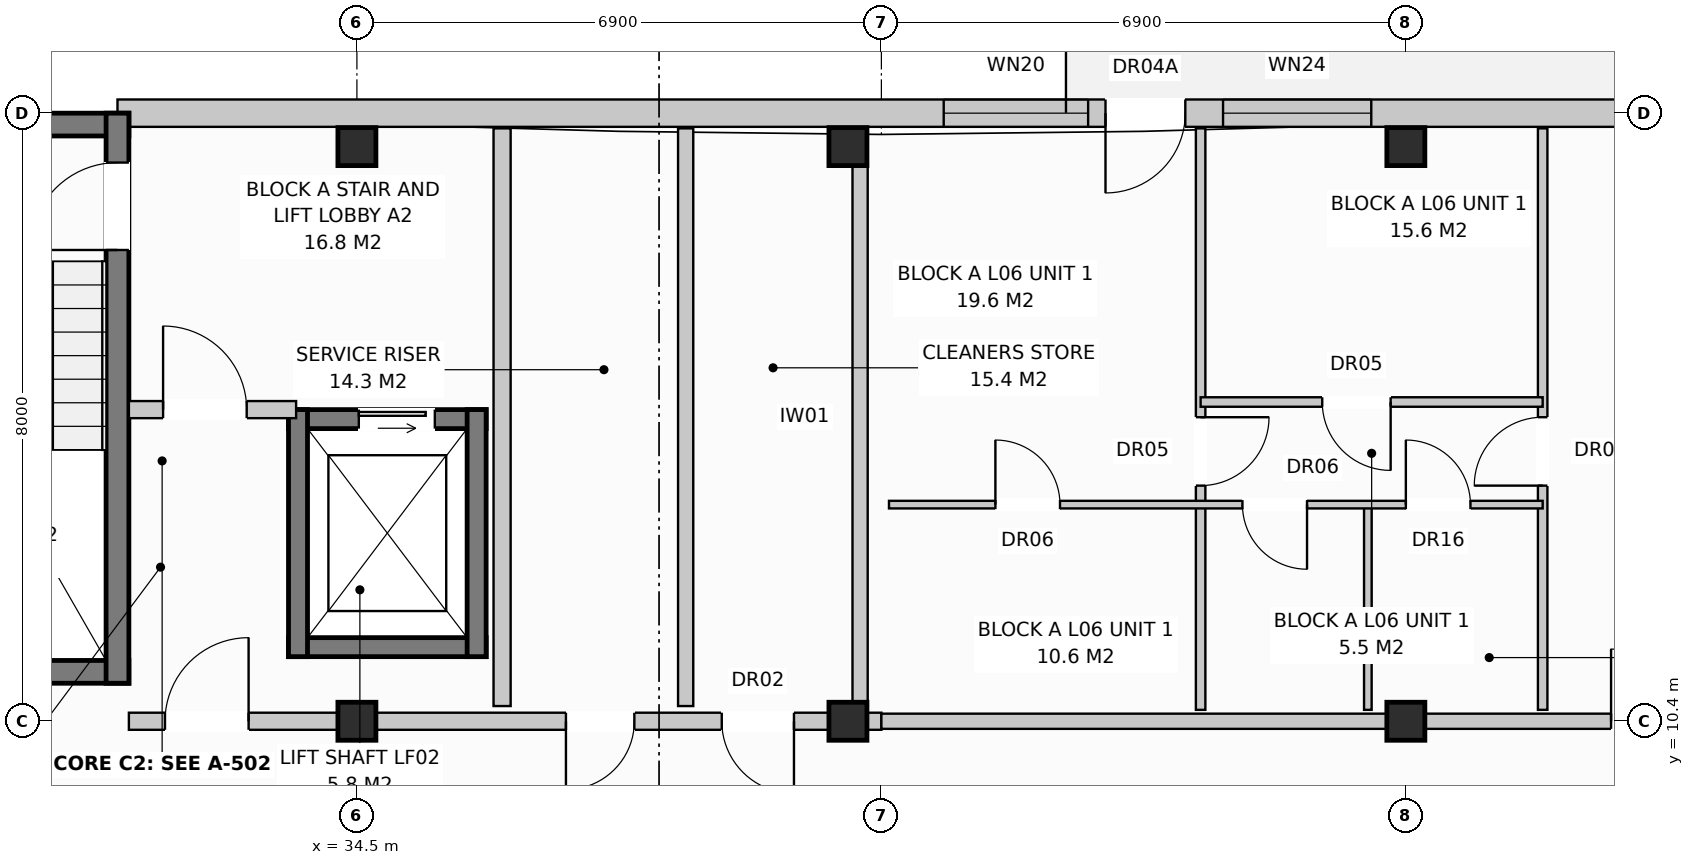
"""IFC4 building model, lengths in metres.
Left out: names, types, materials, properties, quantities, classifications, styles, units other than length and angle.
Written with IfcOpenShell. Run it as: python <this file> out.ifc"""

import sys

from ifc_helpers import new_model, si_unit, direction, frame, frame_2d, origin, origin_with_axes, origin_2d, place, context, subcontext, project, spatial, rectangle, extrude, element, fill, save


model = new_model("IFC4")
c1 = context("Model", 3, precision=1e-05, world=origin(), true_north=direction((0.0, 1.0)))
c2 = subcontext(c1, "Body", "Model", "MODEL_VIEW")
j1 = project(units=[si_unit("LENGTHUNIT", "METRE"), si_unit("PLANEANGLEUNIT", "RADIAN")], contexts=[c1])
p1 = place(None, origin())
s1 = spatial("IfcSite", under=j1, at=p1, CompositionType="ELEMENT")
p2 = place(p1, origin())
s2 = spatial("IfcBuilding", under=s1, at=p2, CompositionType="ELEMENT")
p3 = place(p2, frame((0.0, 0.0, 20.8)))
s3 = spatial("IfcBuildingStorey", under=s2, at=p3, CompositionType="ELEMENT", Elevation=20.8)
for number, where, z_axis, x_axis in (
    (1, (34.5, 10.4, 0.0), (0.0, 0.0, 1.0), (1.0, 0.0, 0.0)),
    (2, (34.5, 17.96, 0.0), (0.0, 0.0, 1.0), (1.0, 0.0, 0.0)),
    (3, (40.96, 10.4, 0.0), (0.0, 0.0, 1.0), (1.0, 0.0, 0.0)),
    (4, (40.96, 17.96, 0.0), (0.0, 0.0, 1.0), (1.0, 0.0, 0.0)),
    (5, (48.3, 10.4, 0.0), (0.0, 0.0, 1.0), (1.0, 0.0, 0.0)),
    (6, (48.3, 17.96, 0.0), (0.0, 0.0, 1.0), (1.0, 0.0, 0.0)),
):
    element("IfcColumn", number, at=place(p3, frame(where, z_axis=z_axis, x_axis=x_axis)), inside=s3, PredefinedType="COLUMN", context=c2, shape_type="SweptSolid", body=[
        extrude(rectangle(XDim=0.5, YDim=0.5, at=origin_2d()), origin(), (0.0, 0.0, 1.0), 3.2),
    ])
p4 = place(p3, frame((31.35, 18.4, 0.0), z_axis=(0.0, 0.0, 1.0), x_axis=(1.0, 0.0, 0.0)))
e7 = element("IfcWall", 7, at=p4, inside=s3, PredefinedType="STANDARD", context=c2, shape_type="SweptSolid", body=[
    extrude(rectangle(XDim=23.68, YDim=0.36, at=frame_2d((11.84, 0.0))), origin(), (0.0, 0.0, 1.0), 2.95),
])
p5 = place(p4, frame((12.999, 0.0, 0.0)))
e8 = element("IfcOpeningElement", 8, at=p5, cuts=e7, PredefinedType="OPENING", context=c2, shape_type="SweptSolid", body=[
    extrude(rectangle(XDim=1.05, YDim=2.12, at=frame_2d((0.525, 1.06))), frame((0.0, 0.192, 0.0), z_axis=(0.0, -1.0, 0.0), x_axis=(1.0, 0.0, 0.0)), (0.0, 0.0, 1.0), 0.384),
])
p6 = place(p4, frame((10.87, 0.0, 0.8)))
e9 = element("IfcOpeningElement", 9, at=p6, cuts=e7, PredefinedType="OPENING", context=c2, shape_type="SweptSolid", body=[
    extrude(rectangle(XDim=1.9, YDim=1.85, at=frame_2d((0.95, 0.925))), frame((0.0, 0.192, 0.0), z_axis=(0.0, -1.0, 0.0), x_axis=(1.0, 0.0, 0.0)), (0.0, 0.0, 1.0), 0.384),
])
p7 = place(p4, frame((14.545, 0.0, 0.8)))
e10 = element("IfcOpeningElement", 10, at=p7, cuts=e7, PredefinedType="OPENING", context=c2, shape_type="SweptSolid", body=[
    extrude(rectangle(XDim=1.95, YDim=1.65, at=frame_2d((0.975, 0.825))), frame((0.0, 0.192, 0.0), z_axis=(0.0, -1.0, 0.0), x_axis=(1.0, 0.0, 0.0)), (0.0, 0.0, 1.0), 0.384),
])
p8 = place(p4, frame((20.67, 0.0, 0.72)))
e11 = element("IfcOpeningElement", 11, at=p8, cuts=e7, PredefinedType="OPENING", context=c2, shape_type="SweptSolid", body=[
    extrude(rectangle(XDim=1.1, YDim=1.5, at=frame_2d((0.55, 0.75))), frame((0.0, 0.192, 0.0), z_axis=(0.0, -1.0, 0.0), x_axis=(1.0, 0.0, 0.0)), (0.0, 0.0, 1.0), 0.384),
])
for number, where, z_axis, x_axis in (
    (12, (27.9, 18.25, 0.0), (0.0, 0.0, 1.0), (1.0, 0.0, 0.0)),
    (13, (27.9, 11.05, 0.0), (0.0, 0.0, 1.0), (1.0, 0.0, 0.0)),
):
    element("IfcWall", number, at=place(p3, frame(where, z_axis=z_axis, x_axis=x_axis)), inside=s3, PredefinedType="SHEAR", context=c2, shape_type="SweptSolid", body=[
        extrude(rectangle(XDim=3.6, YDim=0.3, at=frame_2d((1.8, 0.0))), origin(), (0.0, 0.0, 1.0), 2.95),
    ])
p9 = place(p3, frame((31.35, 10.9, 0.0), z_axis=(0.0, 0.0, 1.0), x_axis=(0.0, 1.0, 0.0)))
e14 = element("IfcWall", 14, at=p9, inside=s3, PredefinedType="SHEAR", context=c2, shape_type="SweptSolid", body=[
    extrude(rectangle(XDim=7.5, YDim=0.3, at=frame_2d((3.75, 0.0))), origin(), (0.0, 0.0, 1.0), 2.95),
])
p10 = place(p9, frame((5.7, 0.0, 0.0)))
e15 = element("IfcOpeningElement", 15, at=p10, cuts=e14, PredefinedType="OPENING", context=c2, shape_type="SweptSolid", body=[
    extrude(rectangle(XDim=1.15, YDim=2.15, at=frame_2d((0.575, 1.075))), frame((0.0, 0.162, 0.0), z_axis=(0.0, -1.0, 0.0), x_axis=(1.0, 0.0, 0.0)), (0.0, 0.0, 1.0), 0.324),
])
p11 = place(p3, frame((33.6, 14.375, 0.0), z_axis=(0.0, 0.0, 1.0), x_axis=(1.0, 0.0, 0.0)))
e16 = element("IfcWall", 16, at=p11, inside=s3, PredefinedType="SHEAR", context=c2, shape_type="SweptSolid", body=[
    extrude(rectangle(XDim=2.6, YDim=0.25, at=frame_2d((1.3, 0.0))), origin(), (0.0, 0.0, 1.0), 2.95),
])
p12 = place(p11, frame((0.925, 0.0, 0.0)))
e17 = element("IfcOpeningElement", 17, at=p12, cuts=e16, PredefinedType="OPENING", context=c2, shape_type="SweptSolid", body=[
    extrude(rectangle(XDim=1.0, YDim=2.1, at=frame_2d((0.5, 1.05))), frame((0.0, 0.137, 0.0), z_axis=(0.0, -1.0, 0.0), x_axis=(1.0, 0.0, 0.0)), (0.0, 0.0, 1.0), 0.274),
])
p13 = place(p3, frame((33.6, 11.375, 0.0), z_axis=(0.0, 0.0, 1.0), x_axis=(1.0, 0.0, 0.0)))
e18 = element("IfcWall", 18, at=p13, inside=s3, PredefinedType="SHEAR", context=c2, shape_type="SweptSolid", body=[
    extrude(rectangle(XDim=2.6, YDim=0.25, at=frame_2d((1.3, 0.0))), origin(), (0.0, 0.0, 1.0), 2.95),
])
for number, where, z_axis, x_axis in (
    (19, (33.725, 11.25, 0.0), (0.0, 0.0, 1.0), (0.0, 1.0, 0.0)),
    (20, (36.075, 11.25, 0.0), (0.0, 0.0, 1.0), (0.0, 1.0, 0.0)),
):
    element("IfcWall", number, at=place(p3, frame(where, z_axis=z_axis, x_axis=x_axis)), inside=s3, PredefinedType="SHEAR", context=c2, shape_type="SweptSolid", body=[
        extrude(rectangle(XDim=3.25, YDim=0.25, at=frame_2d((1.625, 0.0))), origin(), (0.0, 0.0, 1.0), 2.95),
    ])
p14 = place(p3, frame((36.41, 10.6, 0.0), z_axis=(0.0, 0.0, 1.0), x_axis=(0.0, 1.0, 0.0)))
e21 = element("IfcWall", 21, at=p14, inside=s3, PredefinedType="PARTITIONING", context=c2, shape_type="SweptSolid", body=[
    extrude(rectangle(XDim=7.6, YDim=0.225, at=frame_2d((3.8, 0.0))), origin(), (0.0, 0.0, 1.0), 2.59),
])
p15 = place(p3, frame((31.5, 14.5, 0.0), z_axis=(0.0, 0.0, 1.0), x_axis=(1.0, 0.0, 0.0)))
e22 = element("IfcWall", 22, at=p15, inside=s3, PredefinedType="PARTITIONING", context=c2, shape_type="SweptSolid", body=[
    extrude(rectangle(XDim=2.2, YDim=0.225, at=frame_2d((1.1, 0.0))), origin(), (0.0, 0.0, 1.0), 2.95),
])
p16 = place(p15, frame((0.45, 0.0, 0.0)))
e23 = element("IfcOpeningElement", 23, at=p16, cuts=e22, PredefinedType="OPENING", context=c2, shape_type="SweptSolid", body=[
    extrude(rectangle(XDim=1.1, YDim=2.15, at=frame_2d((0.55, 1.075))), frame((0.0, 0.125, 0.0), z_axis=(0.0, -1.0, 0.0), x_axis=(1.0, 0.0, 0.0)), (0.0, 0.0, 1.0), 0.249),
])
for number, where, z_axis, x_axis in (
    (24, (38.825, 10.6, 0.0), (0.0, 0.0, 1.0), (0.0, 1.0, 0.0)),
    (25, (41.12, 10.6, 0.0), (0.0, 0.0, 1.0), (0.0, 1.0, 0.0)),
):
    element("IfcWall", number, at=place(p3, frame(where, z_axis=z_axis, x_axis=x_axis)), inside=s3, PredefinedType="PARTITIONING", context=c2, shape_type="SweptSolid", body=[
        extrude(rectangle(XDim=7.6, YDim=0.2, at=frame_2d((3.8, 0.0))), origin(), (0.0, 0.0, 1.0), 2.95),
    ])
p17 = place(p3, frame((31.5, 10.4, 0.0), z_axis=(0.0, 0.0, 1.0), x_axis=(1.0, 0.0, 0.0)))
e26 = element("IfcWall", 26, at=p17, inside=s3, PredefinedType="PARTITIONING", context=c2, shape_type="SweptSolid", body=[
    extrude(rectangle(XDim=9.9, YDim=0.225, at=frame_2d((4.95, 0.0))), origin(), (0.0, 0.0, 1.0), 2.39),
])
p18 = place(p17, frame((0.475, 0.0, 0.0)))
e27 = element("IfcOpeningElement", 27, at=p18, cuts=e26, PredefinedType="OPENING", context=c2, shape_type="SweptSolid", body=[
    extrude(rectangle(XDim=1.1, YDim=2.15, at=frame_2d((0.55, 1.075))), frame((0.0, 0.125, 0.0), z_axis=(0.0, -1.0, 0.0), x_axis=(1.0, 0.0, 0.0)), (0.0, 0.0, 1.0), 0.249),
])
p19 = place(p17, frame((5.75, 0.0, 0.0)))
e28 = element("IfcOpeningElement", 28, at=p19, cuts=e26, PredefinedType="OPENING", context=c2, shape_type="SweptSolid", body=[
    extrude(rectangle(XDim=0.9, YDim=2.1, at=frame_2d((0.45, 1.05))), frame((0.0, 0.125, 0.0), z_axis=(0.0, -1.0, 0.0), x_axis=(1.0, 0.0, 0.0)), (0.0, 0.0, 1.0), 0.249),
])
p20 = place(p17, frame((7.8, 0.0, 0.0)))
e29 = element("IfcOpeningElement", 29, at=p20, cuts=e26, PredefinedType="OPENING", context=c2, shape_type="SweptSolid", body=[
    extrude(rectangle(XDim=0.95, YDim=2.15, at=frame_2d((0.475, 1.075))), frame((0.0, 0.125, 0.0), z_axis=(0.0, -1.0, 0.0), x_axis=(1.0, 0.0, 0.0)), (0.0, 0.0, 1.0), 0.249),
])
p21 = place(p3, frame((41.4, 10.4, 0.0), z_axis=(0.0, 0.0, 1.0), x_axis=(1.0, 0.0, 0.0)))
e30 = element("IfcWall", 30, at=p21, inside=s3, PredefinedType="PARTITIONING", context=c2, shape_type="SweptSolid", body=[
    extrude(rectangle(XDim=13.8, YDim=0.2, at=frame_2d((6.9, 0.0))), origin(), (0.0, 0.0, 1.0), 2.39),
])
p22 = place(p21, frame((9.6, 0.0, 0.0)))
e31 = element("IfcOpeningElement", 31, at=p22, cuts=e30, PredefinedType="OPENING", context=c2, shape_type="SweptSolid", body=[
    extrude(rectangle(XDim=0.95, YDim=2.15, at=frame_2d((0.475, 1.075))), frame((0.0, 0.112, 0.0), z_axis=(0.0, -1.0, 0.0), x_axis=(1.0, 0.0, 0.0)), (0.0, 0.0, 1.0), 0.224),
])
p23 = place(p3, frame((50.1, 10.55, 0.0), z_axis=(0.0, 0.0, 1.0), x_axis=(0.0, 1.0, 0.0)))
e32 = element("IfcWall", 32, at=p23, inside=s3, PredefinedType="PARTITIONING", context=c2, shape_type="SweptSolid", body=[
    extrude(rectangle(XDim=7.65, YDim=0.125, at=frame_2d((3.825, 0.0))), origin(), (0.0, 0.0, 1.0), 2.95),
])
p24 = place(p23, frame((2.95, 0.0, 0.0)))
e33 = element("IfcOpeningElement", 33, at=p24, cuts=e32, PredefinedType="OPENING", context=c2, shape_type="SweptSolid", body=[
    extrude(rectangle(XDim=0.9, YDim=2.1, at=frame_2d((0.45, 1.05))), frame((0.0, 0.074, 0.0), z_axis=(0.0, -1.0, 0.0), x_axis=(1.0, 0.0, 0.0)), (0.0, 0.0, 1.0), 0.149),
])
p25 = place(p3, frame((45.6, 10.55, 0.0), z_axis=(0.0, 0.0, 1.0), x_axis=(0.0, 1.0, 0.0)))
e34 = element("IfcWall", 34, at=p25, inside=s3, PredefinedType="PARTITIONING", context=c2, shape_type="SweptSolid", body=[
    extrude(rectangle(XDim=7.65, YDim=0.125, at=frame_2d((3.825, 0.0))), origin(), (0.0, 0.0, 1.0), 2.95),
])
p26 = place(p25, frame((2.95, 0.0, 0.0)))
e35 = element("IfcOpeningElement", 35, at=p26, cuts=e34, PredefinedType="OPENING", context=c2, shape_type="SweptSolid", body=[
    extrude(rectangle(XDim=0.9, YDim=2.1, at=frame_2d((0.45, 1.05))), frame((0.0, 0.074, 0.0), z_axis=(0.0, -1.0, 0.0), x_axis=(1.0, 0.0, 0.0)), (0.0, 0.0, 1.0), 0.149),
])
p27 = place(p3, frame((47.8, 10.55, 0.0), z_axis=(0.0, 0.0, 1.0), x_axis=(0.0, 1.0, 0.0)))
e36 = element("IfcWall", 36, at=p27, inside=s3, PredefinedType="PARTITIONING", context=c2, shape_type="SweptSolid", body=[
    extrude(rectangle(XDim=2.7, YDim=0.1, at=frame_2d((1.35, 0.0))), origin(), (0.0, 0.0, 1.0), 2.95),
])
p28 = place(p3, frame((41.5, 13.25, 0.0), z_axis=(0.0, 0.0, 1.0), x_axis=(1.0, 0.0, 0.0)))
e37 = element("IfcWall", 37, at=p28, inside=s3, PredefinedType="PARTITIONING", context=c2, shape_type="SweptSolid", body=[
    extrude(rectangle(XDim=8.6, YDim=0.1, at=frame_2d((4.3, 0.0))), origin(), (0.0, 0.0, 1.0), 2.95),
])
p29 = place(p28, frame((1.4, 0.0, 0.0)))
e38 = element("IfcOpeningElement", 38, at=p29, cuts=e37, PredefinedType="OPENING", context=c2, shape_type="SweptSolid", body=[
    extrude(rectangle(XDim=0.85, YDim=2.05, at=frame_2d((0.425, 1.025))), frame((0.0, 0.062, 0.0), z_axis=(0.0, -1.0, 0.0), x_axis=(1.0, 0.0, 0.0)), (0.0, 0.0, 1.0), 0.124),
])
p30 = place(p28, frame((4.65, 0.0, 0.0)))
e39 = element("IfcOpeningElement", 39, at=p30, cuts=e37, PredefinedType="OPENING", context=c2, shape_type="SweptSolid", body=[
    extrude(rectangle(XDim=0.85, YDim=2.05, at=frame_2d((0.425, 1.025))), frame((0.0, 0.062, 0.0), z_axis=(0.0, -1.0, 0.0), x_axis=(1.0, 0.0, 0.0)), (0.0, 0.0, 1.0), 0.124),
])
p31 = place(p28, frame((6.8, 0.0, 0.0)))
e40 = element("IfcOpeningElement", 40, at=p31, cuts=e37, PredefinedType="OPENING", context=c2, shape_type="SweptSolid", body=[
    extrude(rectangle(XDim=0.85, YDim=2.1, at=frame_2d((0.425, 1.05))), frame((0.0, 0.062, 0.0), z_axis=(0.0, -1.0, 0.0), x_axis=(1.0, 0.0, 0.0)), (0.0, 0.0, 1.0), 0.124),
])
p32 = place(p3, frame((45.6, 14.6, 0.0), z_axis=(0.0, 0.0, 1.0), x_axis=(1.0, 0.0, 0.0)))
e41 = element("IfcWall", 41, at=p32, inside=s3, PredefinedType="PARTITIONING", context=c2, shape_type="SweptSolid", body=[
    extrude(rectangle(XDim=4.5, YDim=0.125, at=frame_2d((2.25, 0.0))), origin(), (0.0, 0.0, 1.0), 2.95),
])
p33 = place(p32, frame((1.6, 0.0, 0.0)))
e42 = element("IfcOpeningElement", 42, at=p33, cuts=e41, PredefinedType="OPENING", context=c2, shape_type="SweptSolid", body=[
    extrude(rectangle(XDim=0.9, YDim=2.1, at=frame_2d((0.45, 1.05))), frame((0.0, 0.074, 0.0), z_axis=(0.0, -1.0, 0.0), x_axis=(1.0, 0.0, 0.0)), (0.0, 0.0, 1.0), 0.149),
])
p34 = place(p5, frame((1.05, 0.0, 0.0), z_axis=(0.0, 0.0, 1.0), x_axis=(-1.0, 0.0, 0.0)))
e43 = element("IfcDoor", 43, at=p34, inside=s3, OperationType="SINGLE_SWING_LEFT", PredefinedType="DOOR", context=c2, shape_type="SweptSolid", body=[
    extrude(rectangle(XDim=1.05, YDim=2.12, at=frame_2d((0.525, 1.06))), frame((0.0, 0.025, 0.0), z_axis=(0.0, -1.0, 0.0), x_axis=(1.0, 0.0, 0.0)), (0.0, 0.0, 1.0), 0.05),
])
fill(e8, e43)
p35 = place(p6, origin_with_axes())
e44 = element("IfcWindow", 44, at=p35, inside=s3, PartitioningType="SINGLE_PANEL", PredefinedType="WINDOW", context=c2, shape_type="SweptSolid", body=[
    extrude(rectangle(XDim=1.9, YDim=1.85, at=frame_2d((0.95, 0.925))), frame((0.0, 0.03, 0.0), z_axis=(0.0, -1.0, 0.0), x_axis=(1.0, 0.0, 0.0)), (0.0, 0.0, 1.0), 0.06),
])
fill(e9, e44)
p36 = place(p7, origin_with_axes())
e45 = element("IfcWindow", 45, at=p36, inside=s3, PartitioningType="SINGLE_PANEL", PredefinedType="WINDOW", context=c2, shape_type="SweptSolid", body=[
    extrude(rectangle(XDim=1.95, YDim=1.65, at=frame_2d((0.975, 0.825))), frame((0.0, 0.03, 0.0), z_axis=(0.0, -1.0, 0.0), x_axis=(1.0, 0.0, 0.0)), (0.0, 0.0, 1.0), 0.06),
])
fill(e10, e45)
p37 = place(p10, origin_with_axes())
e46 = element("IfcDoor", 46, at=p37, inside=s3, OperationType="SINGLE_SWING_LEFT", PredefinedType="DOOR", context=c2, shape_type="SweptSolid", body=[
    extrude(rectangle(XDim=1.15, YDim=2.15, at=frame_2d((0.575, 1.075))), frame((0.0, 0.025, 0.0), z_axis=(0.0, -1.0, 0.0), x_axis=(1.0, 0.0, 0.0)), (0.0, 0.0, 1.0), 0.05),
])
fill(e15, e46)
p38 = place(p12, origin_with_axes())
e47 = element("IfcDoor", 47, at=p38, inside=s3, OperationType="SLIDING_TO_LEFT", PredefinedType="DOOR", context=c2, shape_type="SweptSolid", body=[
    extrude(rectangle(XDim=1.0, YDim=2.1, at=frame_2d((0.5, 1.05))), frame((0.0, 0.025, 0.0), z_axis=(0.0, -1.0, 0.0), x_axis=(1.0, 0.0, 0.0)), (0.0, 0.0, 1.0), 0.05),
])
fill(e17, e47)
p39 = place(p16, origin_with_axes())
e48 = element("IfcDoor", 48, at=p39, inside=s3, OperationType="SINGLE_SWING_LEFT", PredefinedType="DOOR", context=c2, shape_type="SweptSolid", body=[
    extrude(rectangle(XDim=1.1, YDim=2.15, at=frame_2d((0.55, 1.075))), frame((0.0, 0.025, 0.0), z_axis=(0.0, -1.0, 0.0), x_axis=(1.0, 0.0, 0.0)), (0.0, 0.0, 1.0), 0.05),
])
fill(e23, e48)
p40 = place(p18, origin_with_axes())
e49 = element("IfcDoor", 49, at=p40, inside=s3, OperationType="SINGLE_SWING_RIGHT", PredefinedType="DOOR", context=c2, shape_type="SweptSolid", body=[
    extrude(rectangle(XDim=1.1, YDim=2.15, at=frame_2d((0.55, 1.075))), frame((0.0, 0.025, 0.0), z_axis=(0.0, -1.0, 0.0), x_axis=(1.0, 0.0, 0.0)), (0.0, 0.0, 1.0), 0.05),
])
fill(e27, e49)
p41 = place(p19, frame((0.9, 0.0, 0.0), z_axis=(0.0, 0.0, 1.0), x_axis=(-1.0, 0.0, 0.0)))
e50 = element("IfcDoor", 50, at=p41, inside=s3, OperationType="SINGLE_SWING_LEFT", PredefinedType="DOOR", context=c2, shape_type="SweptSolid", body=[
    extrude(rectangle(XDim=0.9, YDim=2.1, at=frame_2d((0.45, 1.05))), frame((0.0, 0.025, 0.0), z_axis=(0.0, -1.0, 0.0), x_axis=(1.0, 0.0, 0.0)), (0.0, 0.0, 1.0), 0.05),
])
fill(e28, e50)
p42 = place(p20, frame((0.95, 0.0, 0.0), z_axis=(0.0, 0.0, 1.0), x_axis=(-1.0, 0.0, 0.0)))
e51 = element("IfcDoor", 51, at=p42, inside=s3, OperationType="SINGLE_SWING_RIGHT", PredefinedType="DOOR", context=c2, shape_type="SweptSolid", body=[
    extrude(rectangle(XDim=0.95, YDim=2.15, at=frame_2d((0.475, 1.075))), frame((0.0, 0.025, 0.0), z_axis=(0.0, -1.0, 0.0), x_axis=(1.0, 0.0, 0.0)), (0.0, 0.0, 1.0), 0.05),
])
fill(e29, e51)
p43 = place(p22, origin_with_axes())
e52 = element("IfcDoor", 52, at=p43, inside=s3, OperationType="SINGLE_SWING_LEFT", PredefinedType="DOOR", context=c2, shape_type="SweptSolid", body=[
    extrude(rectangle(XDim=0.95, YDim=2.15, at=frame_2d((0.475, 1.075))), frame((0.0, 0.025, 0.0), z_axis=(0.0, -1.0, 0.0), x_axis=(1.0, 0.0, 0.0)), (0.0, 0.0, 1.0), 0.05),
])
fill(e31, e52)
p44 = place(p24, origin_with_axes())
e53 = element("IfcDoor", 53, at=p44, inside=s3, OperationType="SINGLE_SWING_LEFT", PredefinedType="DOOR", context=c2, shape_type="SweptSolid", body=[
    extrude(rectangle(XDim=0.9, YDim=2.1, at=frame_2d((0.45, 1.05))), frame((0.0, 0.025, 0.0), z_axis=(0.0, -1.0, 0.0), x_axis=(1.0, 0.0, 0.0)), (0.0, 0.0, 1.0), 0.05),
])
fill(e33, e53)
p45 = place(p26, frame((0.9, 0.0, 0.0), z_axis=(0.0, 0.0, 1.0), x_axis=(-1.0, 0.0, 0.0)))
e54 = element("IfcDoor", 54, at=p45, inside=s3, OperationType="SINGLE_SWING_RIGHT", PredefinedType="DOOR", context=c2, shape_type="SweptSolid", body=[
    extrude(rectangle(XDim=0.9, YDim=2.1, at=frame_2d((0.45, 1.05))), frame((0.0, 0.025, 0.0), z_axis=(0.0, -1.0, 0.0), x_axis=(1.0, 0.0, 0.0)), (0.0, 0.0, 1.0), 0.05),
])
fill(e35, e54)
p46 = place(p29, origin_with_axes())
e55 = element("IfcDoor", 55, at=p46, inside=s3, OperationType="SINGLE_SWING_LEFT", PredefinedType="DOOR", context=c2, shape_type="SweptSolid", body=[
    extrude(rectangle(XDim=0.85, YDim=2.05, at=frame_2d((0.425, 1.025))), frame((0.0, 0.025, 0.0), z_axis=(0.0, -1.0, 0.0), x_axis=(1.0, 0.0, 0.0)), (0.0, 0.0, 1.0), 0.05),
])
fill(e38, e55)
p47 = place(p30, frame((0.85, 0.0, 0.0), z_axis=(0.0, 0.0, 1.0), x_axis=(-1.0, 0.0, 0.0)))
e56 = element("IfcDoor", 56, at=p47, inside=s3, OperationType="SINGLE_SWING_RIGHT", PredefinedType="DOOR", context=c2, shape_type="SweptSolid", body=[
    extrude(rectangle(XDim=0.85, YDim=2.05, at=frame_2d((0.425, 1.025))), frame((0.0, 0.025, 0.0), z_axis=(0.0, -1.0, 0.0), x_axis=(1.0, 0.0, 0.0)), (0.0, 0.0, 1.0), 0.05),
])
fill(e39, e56)
p48 = place(p31, origin_with_axes())
e57 = element("IfcDoor", 57, at=p48, inside=s3, OperationType="SINGLE_SWING_LEFT", PredefinedType="DOOR", context=c2, shape_type="SweptSolid", body=[
    extrude(rectangle(XDim=0.85, YDim=2.1, at=frame_2d((0.425, 1.05))), frame((0.0, 0.025, 0.0), z_axis=(0.0, -1.0, 0.0), x_axis=(1.0, 0.0, 0.0)), (0.0, 0.0, 1.0), 0.05),
])
fill(e40, e57)
p49 = place(p33, frame((0.9, 0.0, 0.0), z_axis=(0.0, 0.0, 1.0), x_axis=(-1.0, 0.0, 0.0)))
e58 = element("IfcDoor", 58, at=p49, inside=s3, OperationType="SINGLE_SWING_RIGHT", PredefinedType="DOOR", context=c2, shape_type="SweptSolid", body=[
    extrude(rectangle(XDim=0.9, YDim=2.1, at=frame_2d((0.45, 1.05))), frame((0.0, 0.025, 0.0), z_axis=(0.0, -1.0, 0.0), x_axis=(1.0, 0.0, 0.0)), (0.0, 0.0, 1.0), 0.05),
])
fill(e42, e58)
save(model, sys.argv[1])
